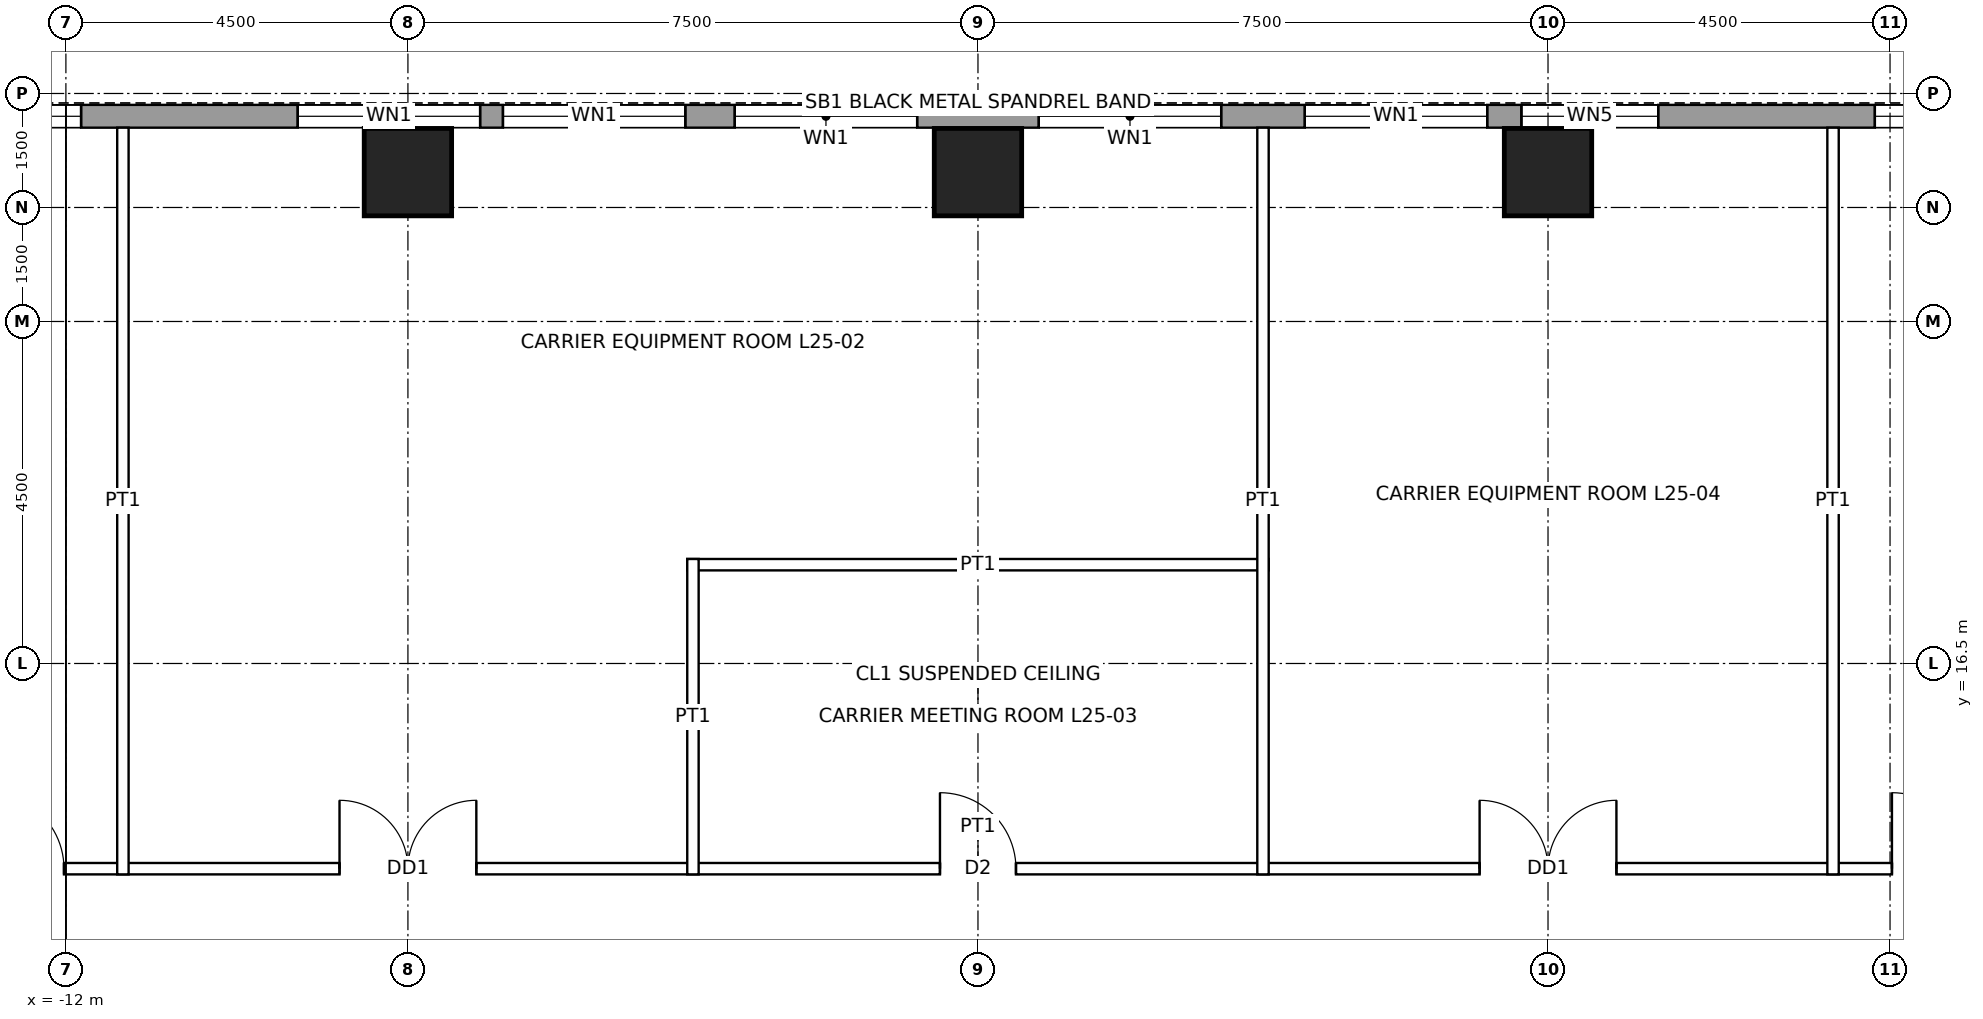
"""IFC4 building model, lengths in metres.
Left out: names, types, materials, properties, quantities, classifications, styles, units other than length and angle.
Written with IfcOpenShell. Run it as: python <this file> out.ifc"""

import sys

from ifc_helpers import new_model, si_unit, direction, frame, frame_2d, origin, origin_2d, place, context, subcontext, project, spatial, rectangle, hollow_rectangle, extrude, element, fill, save


model = new_model("IFC4")
c1 = context("Model", 3, precision=1e-05, world=origin(), true_north=direction((0.0, 1.0)))
c2 = subcontext(c1, "Body", "Model", "MODEL_VIEW")
j1 = project(units=[si_unit("LENGTHUNIT", "METRE"), si_unit("PLANEANGLEUNIT", "RADIAN")], contexts=[c1])
p1 = place(None, origin())
s1 = spatial("IfcSite", under=j1, at=p1, CompositionType="ELEMENT")
p2 = place(p1, origin())
s2 = spatial("IfcBuilding", under=s1, at=p2, CompositionType="ELEMENT")
p3 = place(p2, frame((0.0, 0.0, 126.9)))
s3 = spatial("IfcBuildingStorey", under=s2, at=p3, CompositionType="ELEMENT", Elevation=126.9)
for number, where, z_axis, x_axis in (
    (1, (-7.5, 22.965, 0.0), (0.0, 0.0, 1.0), (1.0, 0.0, 0.0)),
    (2, (0.0, 22.965, 0.0), (0.0, 0.0, 1.0), (1.0, 0.0, 0.0)),
    (3, (7.5, 22.965, 0.0), (0.0, 0.0, 1.0), (1.0, 0.0, 0.0)),
):
    element("IfcColumn", number, at=place(p3, frame(where, z_axis=z_axis, x_axis=x_axis)), inside=s3, PredefinedType="COLUMN", context=c2, shape_type="SweptSolid", body=[
        extrude(hollow_rectangle(XDim=1.15, YDim=1.15, WallThickness=0.075, at=origin_2d()), origin(), (0.0, 0.0, 1.0), 4.5),
    ])
p4 = place(p3, frame((-16.2, 23.7, 0.0), z_axis=(0.0, 0.0, 1.0), x_axis=(1.0, 0.0, 0.0)))
e4 = element("IfcWall", 4, at=p4, inside=s3, PredefinedType="SOLIDWALL", context=c2, shape_type="SweptSolid", body=[
    extrude(rectangle(XDim=32.4, YDim=0.3, at=frame_2d((16.2, 0.0))), origin(), (0.0, 0.0, 1.0), 4.3),
])
p5 = place(p4, frame((2.0, 0.0, 1.0)))
e5 = element("IfcOpeningElement", 5, at=p5, cuts=e4, PredefinedType="OPENING", context=c2, shape_type="SweptSolid", body=[
    extrude(rectangle(XDim=2.4, YDim=1.2, at=frame_2d((1.2, 0.6))), frame((0.0, 0.16, 0.0), z_axis=(0.0, -1.0, 0.0), x_axis=(1.0, 0.0, 0.0)), (0.0, 0.0, 1.0), 0.32),
])
p6 = place(p4, frame((7.25, 0.0, 1.0)))
e6 = element("IfcOpeningElement", 6, at=p6, cuts=e4, PredefinedType="OPENING", context=c2, shape_type="SweptSolid", body=[
    extrude(rectangle(XDim=2.4, YDim=1.2, at=frame_2d((1.2, 0.6))), frame((0.0, 0.16, 0.0), z_axis=(0.0, -1.0, 0.0), x_axis=(1.0, 0.0, 0.0)), (0.0, 0.0, 1.0), 0.32),
])
p7 = place(p4, frame((9.95, 0.0, 1.0)))
e7 = element("IfcOpeningElement", 7, at=p7, cuts=e4, PredefinedType="OPENING", context=c2, shape_type="SweptSolid", body=[
    extrude(rectangle(XDim=2.4, YDim=1.2, at=frame_2d((1.2, 0.6))), frame((0.0, 0.16, 0.0), z_axis=(0.0, -1.0, 0.0), x_axis=(1.0, 0.0, 0.0)), (0.0, 0.0, 1.0), 0.32),
])
p8 = place(p4, frame((13.0, 0.0, 1.0)))
e8 = element("IfcOpeningElement", 8, at=p8, cuts=e4, PredefinedType="OPENING", context=c2, shape_type="SweptSolid", body=[
    extrude(rectangle(XDim=2.4, YDim=1.2, at=frame_2d((1.2, 0.6))), frame((0.0, 0.16, 0.0), z_axis=(0.0, -1.0, 0.0), x_axis=(1.0, 0.0, 0.0)), (0.0, 0.0, 1.0), 0.32),
])
p9 = place(p4, frame((17.0, 0.0, 1.0)))
e9 = element("IfcOpeningElement", 9, at=p9, cuts=e4, PredefinedType="OPENING", context=c2, shape_type="SweptSolid", body=[
    extrude(rectangle(XDim=2.4, YDim=1.2, at=frame_2d((1.2, 0.6))), frame((0.0, 0.16, 0.0), z_axis=(0.0, -1.0, 0.0), x_axis=(1.0, 0.0, 0.0)), (0.0, 0.0, 1.0), 0.32),
])
p10 = place(p4, frame((20.5, 0.0, 1.0)))
e10 = element("IfcOpeningElement", 10, at=p10, cuts=e4, PredefinedType="OPENING", context=c2, shape_type="SweptSolid", body=[
    extrude(rectangle(XDim=2.4, YDim=1.2, at=frame_2d((1.2, 0.6))), frame((0.0, 0.16, 0.0), z_axis=(0.0, -1.0, 0.0), x_axis=(1.0, 0.0, 0.0)), (0.0, 0.0, 1.0), 0.32),
])
p11 = place(p4, frame((23.35, 0.0, 1.0)))
e11 = element("IfcOpeningElement", 11, at=p11, cuts=e4, PredefinedType="OPENING", context=c2, shape_type="SweptSolid", body=[
    extrude(rectangle(XDim=1.8, YDim=1.2, at=frame_2d((0.9, 0.6))), frame((0.0, 0.16, 0.0), z_axis=(0.0, -1.0, 0.0), x_axis=(1.0, 0.0, 0.0)), (0.0, 0.0, 1.0), 0.32),
])
p12 = place(p4, frame((28.0, 0.0, 1.0)))
e12 = element("IfcOpeningElement", 12, at=p12, cuts=e4, PredefinedType="OPENING", context=c2, shape_type="SweptSolid", body=[
    extrude(rectangle(XDim=2.4, YDim=1.2, at=frame_2d((1.2, 0.6))), frame((0.0, 0.16, 0.0), z_axis=(0.0, -1.0, 0.0), x_axis=(1.0, 0.0, 0.0)), (0.0, 0.0, 1.0), 0.32),
])
p13 = place(p3, frame((-13.875, 13.8, 0.0), z_axis=(0.0, 0.0, 1.0), x_axis=(1.0, 0.0, 0.0)))
e13 = element("IfcWall", 13, at=p13, inside=s3, PredefinedType="PARTITIONING", context=c2, shape_type="SweptSolid", body=[
    extrude(rectangle(XDim=27.75, YDim=0.15, at=frame_2d((13.875, 0.0))), origin(), (0.0, 0.0, 1.0), 4.3),
])
p14 = place(p13, frame((5.475, 0.0, 0.0)))
e14 = element("IfcOpeningElement", 14, at=p14, cuts=e13, PredefinedType="OPENING", context=c2, shape_type="SweptSolid", body=[
    extrude(rectangle(XDim=1.8, YDim=2.4, at=frame_2d((0.9, 1.2))), frame((0.0, 0.085, 0.0), z_axis=(0.0, -1.0, 0.0), x_axis=(1.0, 0.0, 0.0)), (0.0, 0.0, 1.0), 0.17),
])
p15 = place(p13, frame((13.375, 0.0, 0.0)))
e15 = element("IfcOpeningElement", 15, at=p15, cuts=e13, PredefinedType="OPENING", context=c2, shape_type="SweptSolid", body=[
    extrude(rectangle(XDim=1.0, YDim=2.1, at=frame_2d((0.5, 1.05))), frame((0.0, 0.085, 0.0), z_axis=(0.0, -1.0, 0.0), x_axis=(1.0, 0.0, 0.0)), (0.0, 0.0, 1.0), 0.17),
])
p16 = place(p13, frame((20.475, 0.0, 0.0)))
e16 = element("IfcOpeningElement", 16, at=p16, cuts=e13, PredefinedType="OPENING", context=c2, shape_type="SweptSolid", body=[
    extrude(rectangle(XDim=1.8, YDim=2.4, at=frame_2d((0.9, 1.2))), frame((0.0, 0.085, 0.0), z_axis=(0.0, -1.0, 0.0), x_axis=(1.0, 0.0, 0.0)), (0.0, 0.0, 1.0), 0.17),
])
p17 = place(p13, frame((25.9, 0.0, 0.0)))
e17 = element("IfcOpeningElement", 17, at=p17, cuts=e13, PredefinedType="OPENING", context=c2, shape_type="SweptSolid", body=[
    extrude(rectangle(XDim=1.0, YDim=2.1, at=frame_2d((0.5, 1.05))), frame((0.0, 0.085, 0.0), z_axis=(0.0, -1.0, 0.0), x_axis=(1.0, 0.0, 0.0)), (0.0, 0.0, 1.0), 0.17),
])
p18 = place(p13, frame((0.85, 0.0, 0.0)))
e18 = element("IfcOpeningElement", 18, at=p18, cuts=e13, PredefinedType="OPENING", context=c2, shape_type="SweptSolid", body=[
    extrude(rectangle(XDim=1.0, YDim=2.1, at=frame_2d((0.5, 1.05))), frame((0.0, 0.085, 0.0), z_axis=(0.0, -1.0, 0.0), x_axis=(1.0, 0.0, 0.0)), (0.0, 0.0, 1.0), 0.17),
])
p19 = place(p3, frame((-3.825, 17.8, 0.0), z_axis=(0.0, 0.0, 1.0), x_axis=(1.0, 0.0, 0.0)))
e19 = element("IfcWall", 19, at=p19, inside=s3, PredefinedType="PARTITIONING", context=c2, shape_type="SweptSolid", body=[
    extrude(rectangle(XDim=7.65, YDim=0.15, at=frame_2d((3.825, 0.0))), origin(), (0.0, 0.0, 1.0), 4.3),
])
p20 = place(p3, frame((-11.25, 13.725, 0.0), z_axis=(0.0, 0.0, 1.0), x_axis=(0.0, 1.0, 0.0)))
e20 = element("IfcWall", 20, at=p20, inside=s3, PredefinedType="PARTITIONING", context=c2, shape_type="SweptSolid", body=[
    extrude(rectangle(XDim=9.825, YDim=0.15, at=frame_2d((4.913, 0.0))), origin(), (0.0, 0.0, 1.0), 3.431),
])
p21 = place(p3, frame((-3.75, 13.725, 0.0), z_axis=(0.0, 0.0, 1.0), x_axis=(0.0, 1.0, 0.0)))
e21 = element("IfcWall", 21, at=p21, inside=s3, PredefinedType="PARTITIONING", context=c2, shape_type="SweptSolid", body=[
    extrude(rectangle(XDim=4.15, YDim=0.15, at=frame_2d((2.075, 0.0))), origin(), (0.0, 0.0, 1.0), 3.431),
])
for number, where, z_axis, x_axis in (
    (22, (3.75, 13.725, 0.0), (0.0, 0.0, 1.0), (0.0, 1.0, 0.0)),
    (23, (11.25, 13.725, 0.0), (0.0, 0.0, 1.0), (0.0, 1.0, 0.0)),
):
    element("IfcWall", number, at=place(p3, frame(where, z_axis=z_axis, x_axis=x_axis)), inside=s3, PredefinedType="PARTITIONING", context=c2, shape_type="SweptSolid", body=[
        extrude(rectangle(XDim=9.825, YDim=0.15, at=frame_2d((4.913, 0.0))), origin(), (0.0, 0.0, 1.0), 3.431),
    ])
p22 = place(p5, origin())
e24 = element("IfcWindow", 24, at=p22, inside=s3, PartitioningType="SINGLE_PANEL", PredefinedType="WINDOW", context=c2, shape_type="SweptSolid", body=[
    extrude(rectangle(XDim=2.4, YDim=1.2, at=frame_2d((1.2, 0.6))), frame((0.0, 0.03, 0.0), z_axis=(0.0, -1.0, 0.0), x_axis=(1.0, 0.0, 0.0)), (0.0, 0.0, 1.0), 0.06),
])
fill(e5, e24)
p23 = place(p6, origin())
e25 = element("IfcWindow", 25, at=p23, inside=s3, PartitioningType="SINGLE_PANEL", PredefinedType="WINDOW", context=c2, shape_type="SweptSolid", body=[
    extrude(rectangle(XDim=2.4, YDim=1.2, at=frame_2d((1.2, 0.6))), frame((0.0, 0.03, 0.0), z_axis=(0.0, -1.0, 0.0), x_axis=(1.0, 0.0, 0.0)), (0.0, 0.0, 1.0), 0.06),
])
fill(e6, e25)
p24 = place(p7, origin())
e26 = element("IfcWindow", 26, at=p24, inside=s3, PartitioningType="SINGLE_PANEL", PredefinedType="WINDOW", context=c2, shape_type="SweptSolid", body=[
    extrude(rectangle(XDim=2.4, YDim=1.2, at=frame_2d((1.2, 0.6))), frame((0.0, 0.03, 0.0), z_axis=(0.0, -1.0, 0.0), x_axis=(1.0, 0.0, 0.0)), (0.0, 0.0, 1.0), 0.06),
])
fill(e7, e26)
p25 = place(p8, origin())
e27 = element("IfcWindow", 27, at=p25, inside=s3, PartitioningType="SINGLE_PANEL", PredefinedType="WINDOW", context=c2, shape_type="SweptSolid", body=[
    extrude(rectangle(XDim=2.4, YDim=1.2, at=frame_2d((1.2, 0.6))), frame((0.0, 0.03, 0.0), z_axis=(0.0, -1.0, 0.0), x_axis=(1.0, 0.0, 0.0)), (0.0, 0.0, 1.0), 0.06),
])
fill(e8, e27)
p26 = place(p9, origin())
e28 = element("IfcWindow", 28, at=p26, inside=s3, PartitioningType="SINGLE_PANEL", PredefinedType="WINDOW", context=c2, shape_type="SweptSolid", body=[
    extrude(rectangle(XDim=2.4, YDim=1.2, at=frame_2d((1.2, 0.6))), frame((0.0, 0.03, 0.0), z_axis=(0.0, -1.0, 0.0), x_axis=(1.0, 0.0, 0.0)), (0.0, 0.0, 1.0), 0.06),
])
fill(e9, e28)
p27 = place(p10, origin())
e29 = element("IfcWindow", 29, at=p27, inside=s3, PartitioningType="SINGLE_PANEL", PredefinedType="WINDOW", context=c2, shape_type="SweptSolid", body=[
    extrude(rectangle(XDim=2.4, YDim=1.2, at=frame_2d((1.2, 0.6))), frame((0.0, 0.03, 0.0), z_axis=(0.0, -1.0, 0.0), x_axis=(1.0, 0.0, 0.0)), (0.0, 0.0, 1.0), 0.06),
])
fill(e10, e29)
p28 = place(p11, origin())
e30 = element("IfcWindow", 30, at=p28, inside=s3, PartitioningType="SINGLE_PANEL", PredefinedType="WINDOW", context=c2, shape_type="SweptSolid", body=[
    extrude(rectangle(XDim=1.8, YDim=1.2, at=frame_2d((0.9, 0.6))), frame((0.0, 0.03, 0.0), z_axis=(0.0, -1.0, 0.0), x_axis=(1.0, 0.0, 0.0)), (0.0, 0.0, 1.0), 0.06),
])
fill(e11, e30)
p29 = place(p12, origin())
e31 = element("IfcWindow", 31, at=p29, inside=s3, PartitioningType="SINGLE_PANEL", PredefinedType="WINDOW", context=c2, shape_type="SweptSolid", body=[
    extrude(rectangle(XDim=2.4, YDim=1.2, at=frame_2d((1.2, 0.6))), frame((0.0, 0.03, 0.0), z_axis=(0.0, -1.0, 0.0), x_axis=(1.0, 0.0, 0.0)), (0.0, 0.0, 1.0), 0.06),
])
fill(e12, e31)
p30 = place(p14, origin())
e32 = element("IfcDoor", 32, at=p30, inside=s3, OperationType="DOUBLE_DOOR_SINGLE_SWING", PredefinedType="DOOR", context=c2, shape_type="SweptSolid", body=[
    extrude(rectangle(XDim=1.8, YDim=2.4, at=frame_2d((0.9, 1.2))), frame((0.0, 0.025, 0.0), z_axis=(0.0, -1.0, 0.0), x_axis=(1.0, 0.0, 0.0)), (0.0, 0.0, 1.0), 0.05),
])
fill(e14, e32)
p31 = place(p15, origin())
e33 = element("IfcDoor", 33, at=p31, inside=s3, OperationType="SINGLE_SWING_LEFT", PredefinedType="DOOR", context=c2, shape_type="SweptSolid", body=[
    extrude(rectangle(XDim=1.0, YDim=2.1, at=frame_2d((0.5, 1.05))), frame((0.0, 0.025, 0.0), z_axis=(0.0, -1.0, 0.0), x_axis=(1.0, 0.0, 0.0)), (0.0, 0.0, 1.0), 0.05),
])
fill(e15, e33)
p32 = place(p16, origin())
e34 = element("IfcDoor", 34, at=p32, inside=s3, OperationType="DOUBLE_DOOR_SINGLE_SWING", PredefinedType="DOOR", context=c2, shape_type="SweptSolid", body=[
    extrude(rectangle(XDim=1.8, YDim=2.4, at=frame_2d((0.9, 1.2))), frame((0.0, 0.025, 0.0), z_axis=(0.0, -1.0, 0.0), x_axis=(1.0, 0.0, 0.0)), (0.0, 0.0, 1.0), 0.05),
])
fill(e16, e34)
p33 = place(p17, origin())
e35 = element("IfcDoor", 35, at=p33, inside=s3, OperationType="SINGLE_SWING_LEFT", PredefinedType="DOOR", context=c2, shape_type="SweptSolid", body=[
    extrude(rectangle(XDim=1.0, YDim=2.1, at=frame_2d((0.5, 1.05))), frame((0.0, 0.025, 0.0), z_axis=(0.0, -1.0, 0.0), x_axis=(1.0, 0.0, 0.0)), (0.0, 0.0, 1.0), 0.05),
])
fill(e17, e35)
p34 = place(p18, origin())
e36 = element("IfcDoor", 36, at=p34, inside=s3, OperationType="SINGLE_SWING_LEFT", PredefinedType="DOOR", context=c2, shape_type="SweptSolid", body=[
    extrude(rectangle(XDim=1.0, YDim=2.1, at=frame_2d((0.5, 1.05))), frame((0.0, 0.025, 0.0), z_axis=(0.0, -1.0, 0.0), x_axis=(1.0, 0.0, 0.0)), (0.0, 0.0, 1.0), 0.05),
])
fill(e18, e36)
save(model, sys.argv[1])
